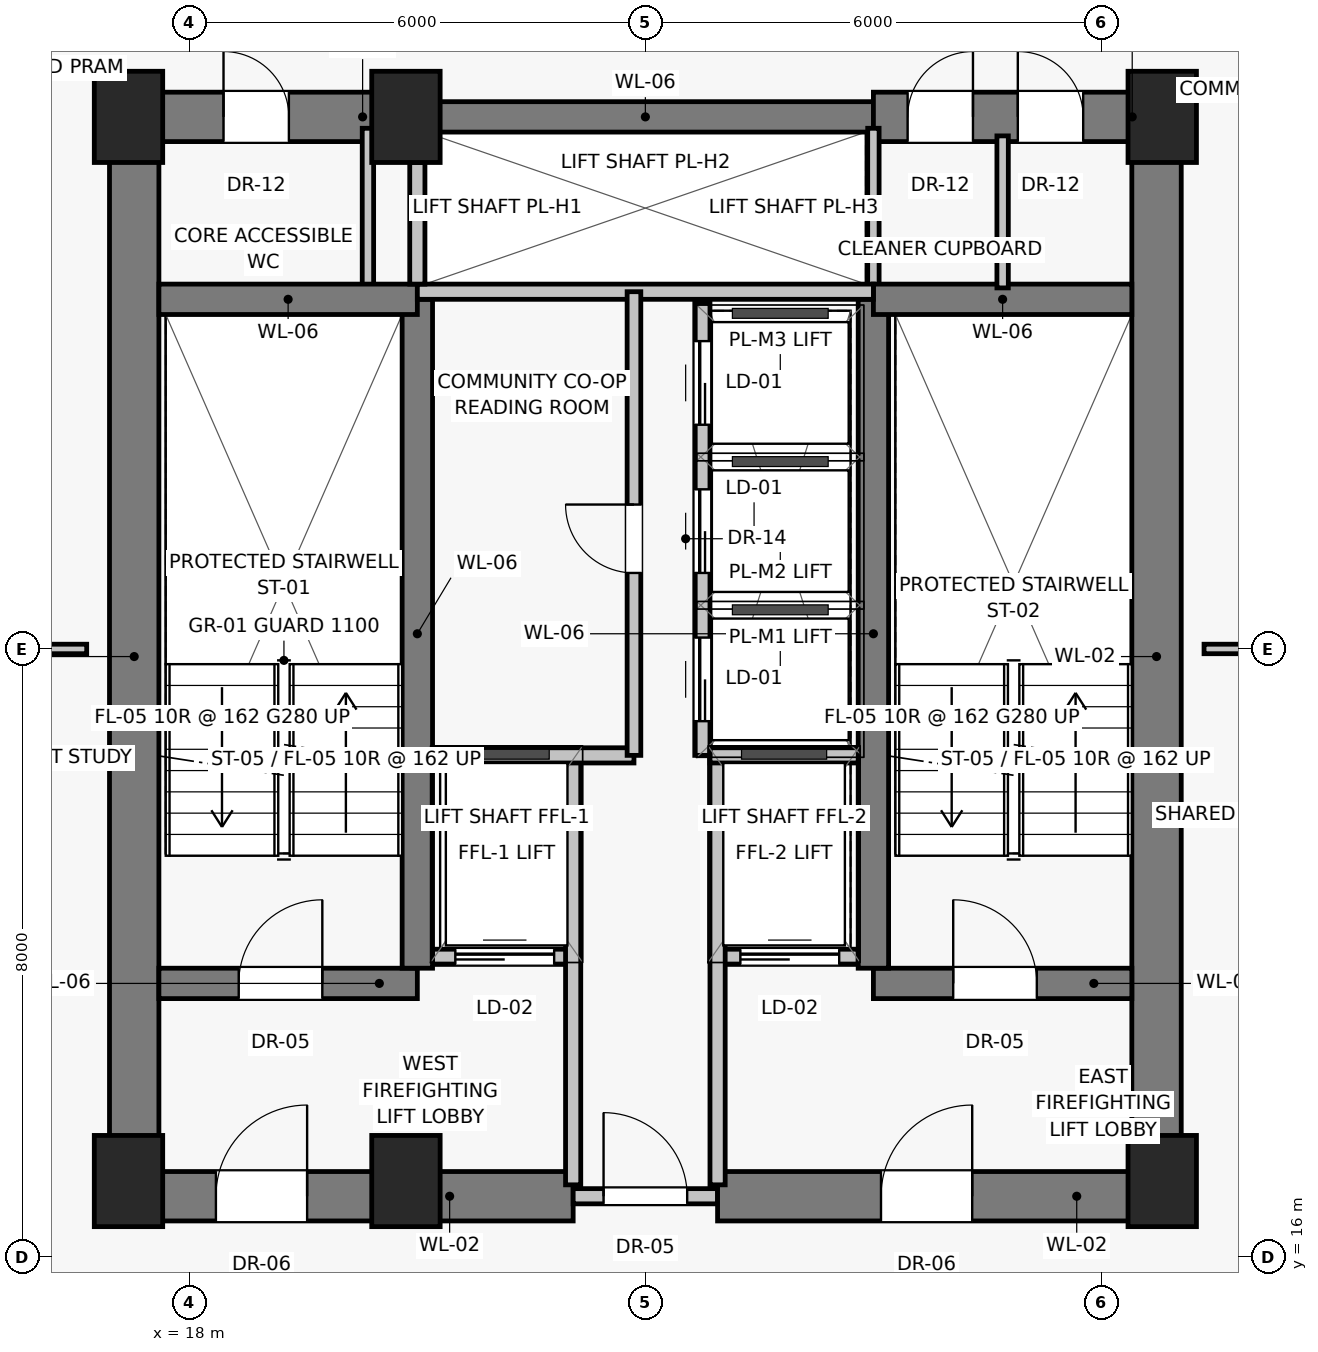
"""IFC4 building model, lengths in metres.
Left out: names, types, materials, properties, quantities, classifications, styles, units other than length and angle.
Written with IfcOpenShell. Run it as: python <this file> out.ifc"""

import sys

from ifc_helpers import new_model, si_unit, direction, frame, frame_2d, origin, origin_2d, place, context, subcontext, project, spatial, rectangle, extrude, source, transform, mapped, element, fill, save


model = new_model("IFC4")
c1 = context("Model", 3, precision=1e-05, world=origin(), true_north=direction((0.0, 1.0)))
c2 = subcontext(c1, "Body", "Model", "MODEL_VIEW")
j1 = project(units=[si_unit("LENGTHUNIT", "METRE"), si_unit("PLANEANGLEUNIT", "RADIAN")], contexts=[c1])
p1 = place(None, origin())
s1 = spatial("IfcSite", under=j1, at=p1, CompositionType="ELEMENT")
p2 = place(p1, origin())
s2 = spatial("IfcBuilding", under=s1, at=p2, CompositionType="ELEMENT")
p3 = place(p2, frame((0.0, 0.0, 166.3)))
s3 = spatial("IfcBuildingStorey", under=s2, at=p3, CompositionType="ELEMENT", Elevation=166.3)
for number, where, z_axis, x_axis in (
    (1, (17.2, 17.0, 0.0), (0.0, 0.0, 1.0), (1.0, 0.0, 0.0)),
    (2, (20.85, 17.0, 0.0), (0.0, 0.0, 1.0), (1.0, 0.0, 0.0)),
    (3, (30.8, 17.0, 0.0), (0.0, 0.0, 1.0), (1.0, 0.0, 0.0)),
    (4, (17.2, 31.0, 0.0), (0.0, 0.0, 1.0), (1.0, 0.0, 0.0)),
    (5, (20.85, 31.0, 0.0), (0.0, 0.0, 1.0), (1.0, 0.0, 0.0)),
    (6, (30.8, 31.0, 0.0), (0.0, 0.0, 1.0), (1.0, 0.0, 0.0)),
):
    element("IfcColumn", number, at=place(p3, frame(where, z_axis=z_axis, x_axis=x_axis)), inside=s3, PredefinedType="PILASTER", context=c2, shape_type="SweptSolid", body=[
        extrude(rectangle(XDim=0.9, YDim=1.2, at=origin_2d()), origin(), (0.0, 0.0, 1.0), 3.25),
    ])
for number, where, z_axis, x_axis in (
    (7, (17.275, 16.8, 0.0), (0.0, 0.0, 1.0), (0.0, 1.0, 0.0)),
    (8, (30.725, 16.8, 0.0), (0.0, 0.0, 1.0), (0.0, 1.0, 0.0)),
):
    element("IfcWall", number, at=place(p3, frame(where, z_axis=z_axis, x_axis=x_axis)), inside=s3, PredefinedType="SHEAR", context=c2, shape_type="SweptSolid", body=[
        extrude(rectangle(XDim=14.2, YDim=0.65, at=frame_2d((7.1, 0.0))), origin(), (0.0, 0.0, 1.0), 2.93),
    ])
p4 = place(p3, frame((17.2, 16.8, 0.0), z_axis=(0.0, 0.0, 1.0), x_axis=(1.0, 0.0, 0.0)))
e9 = element("IfcWall", 9, at=p4, inside=s3, PredefinedType="SHEAR", context=c2, shape_type="SweptSolid", body=[
    extrude(rectangle(XDim=5.85, YDim=0.65, at=frame_2d((2.925, 0.0))), origin(), (0.0, 0.0, 1.0), 2.93),
])
p5 = place(p4, frame((1.15, 0.0, 0.0)))
e10 = element("IfcOpeningElement", 10, at=p5, cuts=e9, PredefinedType="OPENING", context=c2, shape_type="SweptSolid", body=[
    extrude(rectangle(XDim=1.2, YDim=2.03, at=frame_2d((0.6, 1.015))), frame((0.0, 0.335, 0.0), z_axis=(0.0, -1.0, 0.0), x_axis=(1.0, 0.0, 0.0)), (0.0, 0.0, 1.0), 0.67),
])
p6 = place(p3, frame((23.05, 16.8, 0.0), z_axis=(0.0, 0.0, 1.0), x_axis=(1.0, 0.0, 0.0)))
e11 = element("IfcWall", 11, at=p6, inside=s3, PredefinedType="SOLIDWALL", context=c2, shape_type="SweptSolid", body=[
    extrude(rectangle(XDim=1.9, YDim=0.2, at=frame_2d((0.95, 0.0))), origin(), (0.0, 0.0, 1.0), 2.08),
])
p7 = place(p6, frame((0.4, 0.0, 0.0)))
e12 = element("IfcOpeningElement", 12, at=p7, cuts=e11, PredefinedType="OPENING", context=c2, shape_type="SweptSolid", body=[
    extrude(rectangle(XDim=1.1, YDim=2.03, at=frame_2d((0.55, 1.015))), frame((0.0, 0.11, 0.0), z_axis=(0.0, -1.0, 0.0), x_axis=(1.0, 0.0, 0.0)), (0.0, 0.0, 1.0), 0.22),
])
p8 = place(p3, frame((24.95, 16.8, 0.0), z_axis=(0.0, 0.0, 1.0), x_axis=(1.0, 0.0, 0.0)))
e13 = element("IfcWall", 13, at=p8, inside=s3, PredefinedType="SHEAR", context=c2, shape_type="SweptSolid", body=[
    extrude(rectangle(XDim=5.85, YDim=0.65, at=frame_2d((2.925, 0.0))), origin(), (0.0, 0.0, 1.0), 2.93),
])
p9 = place(p8, frame((2.15, 0.0, 0.0)))
e14 = element("IfcOpeningElement", 14, at=p9, cuts=e13, PredefinedType="OPENING", context=c2, shape_type="SweptSolid", body=[
    extrude(rectangle(XDim=1.2, YDim=2.03, at=frame_2d((0.6, 1.015))), frame((0.0, 0.335, 0.0), z_axis=(0.0, -1.0, 0.0), x_axis=(1.0, 0.0, 0.0)), (0.0, 0.0, 1.0), 0.67),
])
p10 = place(p3, frame((17.2, 31.0, 0.0), z_axis=(0.0, 0.0, 1.0), x_axis=(1.0, 0.0, 0.0)))
e15 = element("IfcWall", 15, at=p10, inside=s3, PredefinedType="SHEAR", context=c2, shape_type="SweptSolid", body=[
    extrude(rectangle(XDim=3.8, YDim=0.65, at=frame_2d((1.9, 0.0))), origin(), (0.0, 0.0, 1.0), 2.93),
])
p11 = place(p10, frame((1.25, 0.0, 0.0)))
e16 = element("IfcOpeningElement", 16, at=p11, cuts=e15, PredefinedType="OPENING", context=c2, shape_type="SweptSolid", body=[
    extrude(rectangle(XDim=0.86, YDim=2.01, at=frame_2d((0.43, 1.005))), frame((0.0, 0.335, 0.0), z_axis=(0.0, -1.0, 0.0), x_axis=(1.0, 0.0, 0.0)), (0.0, 0.0, 1.0), 0.67),
])
p12 = place(p3, frame((21.0, 31.0, 0.0), z_axis=(0.0, 0.0, 1.0), x_axis=(1.0, 0.0, 0.0)))
e17 = element("IfcWall", 17, at=p12, inside=s3, PredefinedType="SHEAR", context=c2, shape_type="SweptSolid", body=[
    extrude(rectangle(XDim=6.0, YDim=0.4, at=frame_2d((3.0, 0.0))), origin(), (0.0, 0.0, 1.0), 2.93),
])
p13 = place(p3, frame((27.0, 31.0, 0.0), z_axis=(0.0, 0.0, 1.0), x_axis=(1.0, 0.0, 0.0)))
e18 = element("IfcWall", 18, at=p13, inside=s3, PredefinedType="SHEAR", context=c2, shape_type="SweptSolid", body=[
    extrude(rectangle(XDim=3.8, YDim=0.65, at=frame_2d((1.9, 0.0))), origin(), (0.0, 0.0, 1.0), 2.93),
])
p14 = place(p13, frame((0.45, 0.0, 0.0)))
e19 = element("IfcOpeningElement", 19, at=p14, cuts=e18, PredefinedType="OPENING", context=c2, shape_type="SweptSolid", body=[
    extrude(rectangle(XDim=0.86, YDim=2.01, at=frame_2d((0.43, 1.005))), frame((0.0, 0.335, 0.0), z_axis=(0.0, -1.0, 0.0), x_axis=(1.0, 0.0, 0.0)), (0.0, 0.0, 1.0), 0.67),
])
p15 = place(p13, frame((1.9, 0.0, 0.0)))
e20 = element("IfcOpeningElement", 20, at=p15, cuts=e18, PredefinedType="OPENING", context=c2, shape_type="SweptSolid", body=[
    extrude(rectangle(XDim=0.86, YDim=2.01, at=frame_2d((0.43, 1.005))), frame((0.0, 0.335, 0.0), z_axis=(0.0, -1.0, 0.0), x_axis=(1.0, 0.0, 0.0)), (0.0, 0.0, 1.0), 0.67),
])
for number, where, z_axis, x_axis in (
    (21, (20.35, 28.65, 0.0), (0.0, 0.0, 1.0), (0.0, 1.0, 0.0)),
    (22, (27.0, 28.65, 0.0), (0.0, 0.0, 1.0), (0.0, 1.0, 0.0)),
):
    element("IfcWall", number, at=place(p3, frame(where, z_axis=z_axis, x_axis=x_axis)), inside=s3, PredefinedType="PARTITIONING", context=c2, shape_type="SweptSolid", body=[
        extrude(rectangle(XDim=2.2, YDim=0.15, at=frame_2d((1.1, 0.0))), origin(), (0.0, 0.0, 1.0), 2.93),
    ])
p16 = place(p3, frame((17.6, 19.6, 0.0), z_axis=(0.0, 0.0, 1.0), x_axis=(1.0, 0.0, 0.0)))
e23 = element("IfcWall", 23, at=p16, inside=s3, PredefinedType="SHEAR", context=c2, shape_type="SweptSolid", body=[
    extrude(rectangle(XDim=3.4, YDim=0.4, at=frame_2d((1.7, 0.0))), origin(), (0.0, 0.0, 1.0), 2.93),
])
p17 = place(p16, frame((1.05, 0.0, 0.0)))
e24 = element("IfcOpeningElement", 24, at=p17, cuts=e23, PredefinedType="OPENING", context=c2, shape_type="SweptSolid", body=[
    extrude(rectangle(XDim=1.1, YDim=2.03, at=frame_2d((0.55, 1.015))), frame((0.0, 0.21, 0.0), z_axis=(0.0, -1.0, 0.0), x_axis=(1.0, 0.0, 0.0)), (0.0, 0.0, 1.0), 0.42),
])
p18 = place(p3, frame((21.2, 19.95, 0.0), z_axis=(0.0, 0.0, 1.0), x_axis=(1.0, 0.0, 0.0)))
e25 = element("IfcWall", 25, at=p18, inside=s3, PredefinedType="SOLIDWALL", context=c2, shape_type="SweptSolid", body=[
    extrude(rectangle(XDim=1.85, YDim=0.2, at=frame_2d((0.925, 0.0))), origin(), (0.0, 0.0, 1.0), 2.93),
])
p19 = place(p18, frame((0.3, 0.0, 0.0)))
e26 = element("IfcOpeningElement", 26, at=p19, cuts=e25, PredefinedType="OPENING", context=c2, shape_type="SweptSolid", body=[
    extrude(rectangle(XDim=1.3, YDim=2.25, at=frame_2d((0.65, 1.125))), frame((0.0, 0.11, 0.0), z_axis=(0.0, -1.0, 0.0), x_axis=(1.0, 0.0, 0.0)), (0.0, 0.0, 1.0), 0.22),
])
p20 = place(p3, frame((24.95, 19.95, 0.0), z_axis=(0.0, 0.0, 1.0), x_axis=(1.0, 0.0, 0.0)))
e27 = element("IfcWall", 27, at=p20, inside=s3, PredefinedType="SOLIDWALL", context=c2, shape_type="SweptSolid", body=[
    extrude(rectangle(XDim=1.85, YDim=0.2, at=frame_2d((0.925, 0.0))), origin(), (0.0, 0.0, 1.0), 2.93),
])
p21 = place(p20, frame((0.3, 0.0, 0.0)))
e28 = element("IfcOpeningElement", 28, at=p21, cuts=e27, PredefinedType="OPENING", context=c2, shape_type="SweptSolid", body=[
    extrude(rectangle(XDim=1.3, YDim=2.25, at=frame_2d((0.65, 1.125))), frame((0.0, 0.11, 0.0), z_axis=(0.0, -1.0, 0.0), x_axis=(1.0, 0.0, 0.0)), (0.0, 0.0, 1.0), 0.22),
])
p22 = place(p3, frame((27.0, 19.6, 0.0), z_axis=(0.0, 0.0, 1.0), x_axis=(1.0, 0.0, 0.0)))
e29 = element("IfcWall", 29, at=p22, inside=s3, PredefinedType="SHEAR", context=c2, shape_type="SweptSolid", body=[
    extrude(rectangle(XDim=3.4, YDim=0.4, at=frame_2d((1.7, 0.0))), origin(), (0.0, 0.0, 1.0), 2.93),
])
p23 = place(p22, frame((1.05, 0.0, 0.0)))
e30 = element("IfcOpeningElement", 30, at=p23, cuts=e29, PredefinedType="OPENING", context=c2, shape_type="SweptSolid", body=[
    extrude(rectangle(XDim=1.1, YDim=2.03, at=frame_2d((0.55, 1.015))), frame((0.0, 0.21, 0.0), z_axis=(0.0, -1.0, 0.0), x_axis=(1.0, 0.0, 0.0)), (0.0, 0.0, 1.0), 0.42),
])
for number, where, z_axis, x_axis in (
    (31, (21.0, 19.8, 0.0), (0.0, 0.0, 1.0), (0.0, 1.0, 0.0)),
    (32, (27.0, 19.8, 0.0), (0.0, 0.0, 1.0), (0.0, 1.0, 0.0)),
):
    element("IfcWall", number, at=place(p3, frame(where, z_axis=z_axis, x_axis=x_axis)), inside=s3, PredefinedType="SHEAR", context=c2, shape_type="SweptSolid", body=[
        extrude(rectangle(XDim=8.8, YDim=0.4, at=frame_2d((4.4, 0.0))), origin(), (0.0, 0.0, 1.0), 2.93),
    ])
for number, where, z_axis, x_axis in (
    (33, (17.6, 28.6, 0.0), (0.0, 0.0, 1.0), (1.0, 0.0, 0.0)),
    (34, (27.0, 28.6, 0.0), (0.0, 0.0, 1.0), (1.0, 0.0, 0.0)),
):
    element("IfcWall", number, at=place(p3, frame(where, z_axis=z_axis, x_axis=x_axis)), inside=s3, PredefinedType="SHEAR", context=c2, shape_type="SweptSolid", body=[
        extrude(rectangle(XDim=3.4, YDim=0.4, at=frame_2d((1.7, 0.0))), origin(), (0.0, 0.0, 1.0), 2.93),
    ])
for number, where, z_axis, x_axis in (
    (35, (23.05, 16.95, 0.0), (0.0, 0.0, 1.0), (0.0, 1.0, 0.0)),
    (36, (24.95, 16.95, 0.0), (0.0, 0.0, 1.0), (0.0, 1.0, 0.0)),
):
    element("IfcWall", number, at=place(p3, frame(where, z_axis=z_axis, x_axis=x_axis)), inside=s3, PredefinedType="SOLIDWALL", context=c2, shape_type="SweptSolid", body=[
        extrude(rectangle(XDim=5.6, YDim=0.2, at=frame_2d((2.8, 0.0))), origin(), (0.0, 0.0, 1.0), 2.93),
    ])
p24 = place(p3, frame((21.2, 22.6, 0.0), z_axis=(0.0, 0.0, 1.0), x_axis=(1.0, 0.0, 0.0)))
e37 = element("IfcWall", 37, at=p24, inside=s3, PredefinedType="SOLIDWALL", context=c2, shape_type="SweptSolid", body=[
    extrude(rectangle(XDim=2.65, YDim=0.2, at=frame_2d((1.325, 0.0))), origin(), (0.0, 0.0, 1.0), 2.93),
])
p25 = place(p3, frame((24.85, 22.6, 0.0), z_axis=(0.0, 0.0, 1.0), x_axis=(1.0, 0.0, 0.0)))
e38 = element("IfcWall", 38, at=p25, inside=s3, PredefinedType="SOLIDWALL", context=c2, shape_type="SweptSolid", body=[
    extrude(rectangle(XDim=1.95, YDim=0.2, at=frame_2d((0.975, 0.0))), origin(), (0.0, 0.0, 1.0), 2.93),
])
p26 = place(p3, frame((21.0, 28.7, 0.0), z_axis=(0.0, 0.0, 1.0), x_axis=(1.0, 0.0, 0.0)))
e39 = element("IfcWall", 39, at=p26, inside=s3, PredefinedType="SOLIDWALL", context=c2, shape_type="SweptSolid", body=[
    extrude(rectangle(XDim=6.0, YDim=0.2, at=frame_2d((3.0, 0.0))), origin(), (0.0, 0.0, 1.0), 2.93),
])
p27 = place(p3, frame((21.0, 28.8, 0.0), z_axis=(0.0, 0.0, 1.0), x_axis=(0.0, 1.0, 0.0)))
e40 = element("IfcWall", 40, at=p27, inside=s3, PredefinedType="SOLIDWALL", context=c2, shape_type="SweptSolid", body=[
    extrude(rectangle(XDim=1.6, YDim=0.2, at=frame_2d((0.8, 0.0))), origin(), (0.0, 0.0, 1.0), 2.93),
])
p28 = place(p3, frame((23.85, 22.6, 0.0), z_axis=(0.0, 0.0, 1.0), x_axis=(0.0, 1.0, 0.0)))
e41 = element("IfcWall", 41, at=p28, inside=s3, PredefinedType="PARTITIONING", context=c2, shape_type="SweptSolid", body=[
    extrude(rectangle(XDim=6.1, YDim=0.18, at=frame_2d((3.05, 0.0))), origin(), (0.0, 0.0, 1.0), 2.93),
])
p29 = place(p28, frame((2.4, 0.0, 0.0)))
e42 = element("IfcOpeningElement", 42, at=p29, cuts=e41, PredefinedType="OPENING", context=c2, shape_type="SweptSolid", body=[
    extrude(rectangle(XDim=0.9, YDim=2.01, at=frame_2d((0.45, 1.005))), frame((0.0, 0.1, 0.0), z_axis=(0.0, -1.0, 0.0), x_axis=(1.0, 0.0, 0.0)), (0.0, 0.0, 1.0), 0.2),
])
p30 = place(p3, frame((24.75, 22.6, 0.0), z_axis=(0.0, 0.0, 1.0), x_axis=(0.0, 1.0, 0.0)))
e43 = element("IfcWall", 43, at=p30, inside=s3, PredefinedType="SOLIDWALL", context=c2, shape_type="SweptSolid", body=[
    extrude(rectangle(XDim=5.95, YDim=0.2, at=frame_2d((2.975, 0.0))), origin(), (0.0, 0.0, 1.0), 2.93),
])
p31 = place(p30, frame((0.45, 0.0, 0.0)))
e44 = element("IfcOpeningElement", 44, at=p31, cuts=e43, PredefinedType="OPENING", context=c2, shape_type="SweptSolid", body=[
    extrude(rectangle(XDim=1.1, YDim=2.08, at=frame_2d((0.55, 1.04))), frame((0.0, 0.11, 0.0), z_axis=(0.0, -1.0, 0.0), x_axis=(1.0, 0.0, 0.0)), (0.0, 0.0, 1.0), 0.22),
])
p32 = place(p30, frame((2.4, 0.0, 0.0)))
e45 = element("IfcOpeningElement", 45, at=p32, cuts=e43, PredefinedType="OPENING", context=c2, shape_type="SweptSolid", body=[
    extrude(rectangle(XDim=1.1, YDim=2.08, at=frame_2d((0.55, 1.04))), frame((0.0, 0.11, 0.0), z_axis=(0.0, -1.0, 0.0), x_axis=(1.0, 0.0, 0.0)), (0.0, 0.0, 1.0), 0.22),
])
p33 = place(p30, frame((4.35, 0.0, 0.0)))
e46 = element("IfcOpeningElement", 46, at=p33, cuts=e43, PredefinedType="OPENING", context=c2, shape_type="SweptSolid", body=[
    extrude(rectangle(XDim=1.1, YDim=2.08, at=frame_2d((0.55, 1.04))), frame((0.0, 0.11, 0.0), z_axis=(0.0, -1.0, 0.0), x_axis=(1.0, 0.0, 0.0)), (0.0, 0.0, 1.0), 0.22),
])
p34 = place(p3, frame((28.7, 28.75, 0.0), z_axis=(0.0, 0.0, 1.0), x_axis=(0.0, 1.0, 0.0)))
e47 = element("IfcWall", 47, at=p34, inside=s3, PredefinedType="PARTITIONING", context=c2, shape_type="SweptSolid", body=[
    extrude(rectangle(XDim=2.0, YDim=0.15, at=frame_2d((1.0, 0.0))), origin(), (0.0, 0.0, 1.0), 2.93),
])
for number, where, z_axis, x_axis in (
    (48, (14.55, 24.0, 0.0), (0.0, 0.0, 1.0), (1.0, 0.0, 0.0)),
    (49, (31.35, 24.0, 0.0), (0.0, 0.0, 1.0), (1.0, 0.0, 0.0)),
):
    element("IfcWall", number, at=place(p3, frame(where, z_axis=z_axis, x_axis=x_axis)), inside=s3, PredefinedType="PARTITIONING", context=c2, shape_type="SweptSolid", body=[
        extrude(rectangle(XDim=2.1, YDim=0.125, at=frame_2d((1.05, 0.0))), origin(), (0.0, 0.0, 1.0), 2.93),
    ])
m1 = source(origin(), c2, "Body", "SweptSolid", [
    extrude(rectangle(XDim=1.2, YDim=2.03, at=frame_2d((0.6, 1.015))), frame((0.0, 0.025, 0.0), z_axis=(0.0, -1.0, 0.0), x_axis=(1.0, 0.0, 0.0)), (0.0, 0.0, 1.0), 0.05),
])
p35 = place(p5, origin())
e50 = element("IfcDoor", 50, at=p35, inside=s3, OperationType="SINGLE_SWING_RIGHT", PredefinedType="DOOR", context=c2, shape_type="MappedRepresentation", body=[
    mapped(m1, transform((0.0, 0.0, 0.0), scale=1.0)),
])
fill(e10, e50)
m2 = source(origin(), c2, "Body", "SweptSolid", [
    extrude(rectangle(XDim=1.1, YDim=2.03, at=frame_2d((0.55, 1.015))), frame((0.0, 0.025, 0.0), z_axis=(0.0, -1.0, 0.0), x_axis=(1.0, 0.0, 0.0)), (0.0, 0.0, 1.0), 0.05),
])
p36 = place(p7, origin())
e51 = element("IfcDoor", 51, at=p36, inside=s3, OperationType="SINGLE_SWING_LEFT", PredefinedType="DOOR", context=c2, shape_type="MappedRepresentation", body=[
    mapped(m2, transform((0.0, 0.0, 0.0), scale=1.0)),
])
fill(e12, e51)
p37 = place(p9, origin())
e52 = element("IfcDoor", 52, at=p37, inside=s3, OperationType="SINGLE_SWING_RIGHT", PredefinedType="DOOR", context=c2, shape_type="MappedRepresentation", body=[
    mapped(m1, transform((0.0, 0.0, 0.0), scale=1.0)),
])
fill(e14, e52)
m3 = source(origin(), c2, "Body", "SweptSolid", [
    extrude(rectangle(XDim=0.86, YDim=2.01, at=frame_2d((0.43, 1.005))), frame((0.0, 0.025, 0.0), z_axis=(0.0, -1.0, 0.0), x_axis=(1.0, 0.0, 0.0)), (0.0, 0.0, 1.0), 0.05),
])
p38 = place(p11, origin())
e53 = element("IfcDoor", 53, at=p38, inside=s3, OperationType="SINGLE_SWING_LEFT", PredefinedType="DOOR", context=c2, shape_type="MappedRepresentation", body=[
    mapped(m3, transform((0.0, 0.0, 0.0), scale=1.0)),
])
fill(e16, e53)
p39 = place(p14, origin())
e54 = element("IfcDoor", 54, at=p39, inside=s3, OperationType="SINGLE_SWING_RIGHT", PredefinedType="DOOR", context=c2, shape_type="MappedRepresentation", body=[
    mapped(m3, transform((0.0, 0.0, 0.0), scale=1.0)),
])
fill(e19, e54)
p40 = place(p15, origin())
e55 = element("IfcDoor", 55, at=p40, inside=s3, OperationType="SINGLE_SWING_LEFT", PredefinedType="DOOR", context=c2, shape_type="MappedRepresentation", body=[
    mapped(m3, transform((0.0, 0.0, 0.0), scale=1.0)),
])
fill(e20, e55)
p41 = place(p17, origin())
e56 = element("IfcDoor", 56, at=p41, inside=s3, OperationType="SINGLE_SWING_RIGHT", PredefinedType="DOOR", context=c2, shape_type="MappedRepresentation", body=[
    mapped(m2, transform((0.0, 0.0, 0.0), scale=1.0)),
])
fill(e24, e56)
m4 = source(origin(), c2, "Body", "SweptSolid", [
    extrude(rectangle(XDim=1.3, YDim=2.25, at=frame_2d((0.65, 1.125))), frame((0.0, 0.025, 0.0), z_axis=(0.0, -1.0, 0.0), x_axis=(1.0, 0.0, 0.0)), (0.0, 0.0, 1.0), 0.05),
])
p42 = place(p19, origin())
e57 = element("IfcDoor", 57, at=p42, inside=s3, OperationType="SLIDING_TO_LEFT", PredefinedType="DOOR", context=c2, shape_type="MappedRepresentation", body=[
    mapped(m4, transform((0.0, 0.0, 0.0), scale=1.0)),
])
fill(e26, e57)
p43 = place(p21, origin())
e58 = element("IfcDoor", 58, at=p43, inside=s3, OperationType="SLIDING_TO_LEFT", PredefinedType="DOOR", context=c2, shape_type="MappedRepresentation", body=[
    mapped(m4, transform((0.0, 0.0, 0.0), scale=1.0)),
])
fill(e28, e58)
p44 = place(p23, origin())
e59 = element("IfcDoor", 59, at=p44, inside=s3, OperationType="SINGLE_SWING_LEFT", PredefinedType="DOOR", context=c2, shape_type="MappedRepresentation", body=[
    mapped(m2, transform((0.0, 0.0, 0.0), scale=1.0)),
])
fill(e30, e59)
m5 = source(origin(), c2, "Body", "SweptSolid", [
    extrude(rectangle(XDim=0.9, YDim=2.01, at=frame_2d((0.45, 1.005))), frame((0.0, 0.025, 0.0), z_axis=(0.0, -1.0, 0.0), x_axis=(1.0, 0.0, 0.0)), (0.0, 0.0, 1.0), 0.05),
])
p45 = place(p29, origin())
e60 = element("IfcDoor", 60, at=p45, inside=s3, OperationType="SINGLE_SWING_RIGHT", PredefinedType="DOOR", context=c2, shape_type="MappedRepresentation", body=[
    mapped(m5, transform((0.0, 0.0, 0.0), scale=1.0)),
])
fill(e42, e60)
m6 = source(origin(), c2, "Body", "SweptSolid", [
    extrude(rectangle(XDim=1.1, YDim=2.08, at=frame_2d((0.55, 1.04))), frame((0.0, 0.025, 0.0), z_axis=(0.0, -1.0, 0.0), x_axis=(1.0, 0.0, 0.0)), (0.0, 0.0, 1.0), 0.05),
])
p46 = place(p31, origin())
e61 = element("IfcDoor", 61, at=p46, inside=s3, OperationType="SLIDING_TO_LEFT", PredefinedType="DOOR", context=c2, shape_type="MappedRepresentation", body=[
    mapped(m6, transform((0.0, 0.0, 0.0), scale=1.0)),
])
fill(e44, e61)
p47 = place(p32, origin())
e62 = element("IfcDoor", 62, at=p47, inside=s3, OperationType="SLIDING_TO_LEFT", PredefinedType="DOOR", context=c2, shape_type="MappedRepresentation", body=[
    mapped(m6, transform((0.0, 0.0, 0.0), scale=1.0)),
])
fill(e45, e62)
p48 = place(p33, origin())
e63 = element("IfcDoor", 63, at=p48, inside=s3, OperationType="SLIDING_TO_LEFT", PredefinedType="DOOR", context=c2, shape_type="MappedRepresentation", body=[
    mapped(m6, transform((0.0, 0.0, 0.0), scale=1.0)),
])
fill(e46, e63)
save(model, sys.argv[1])
